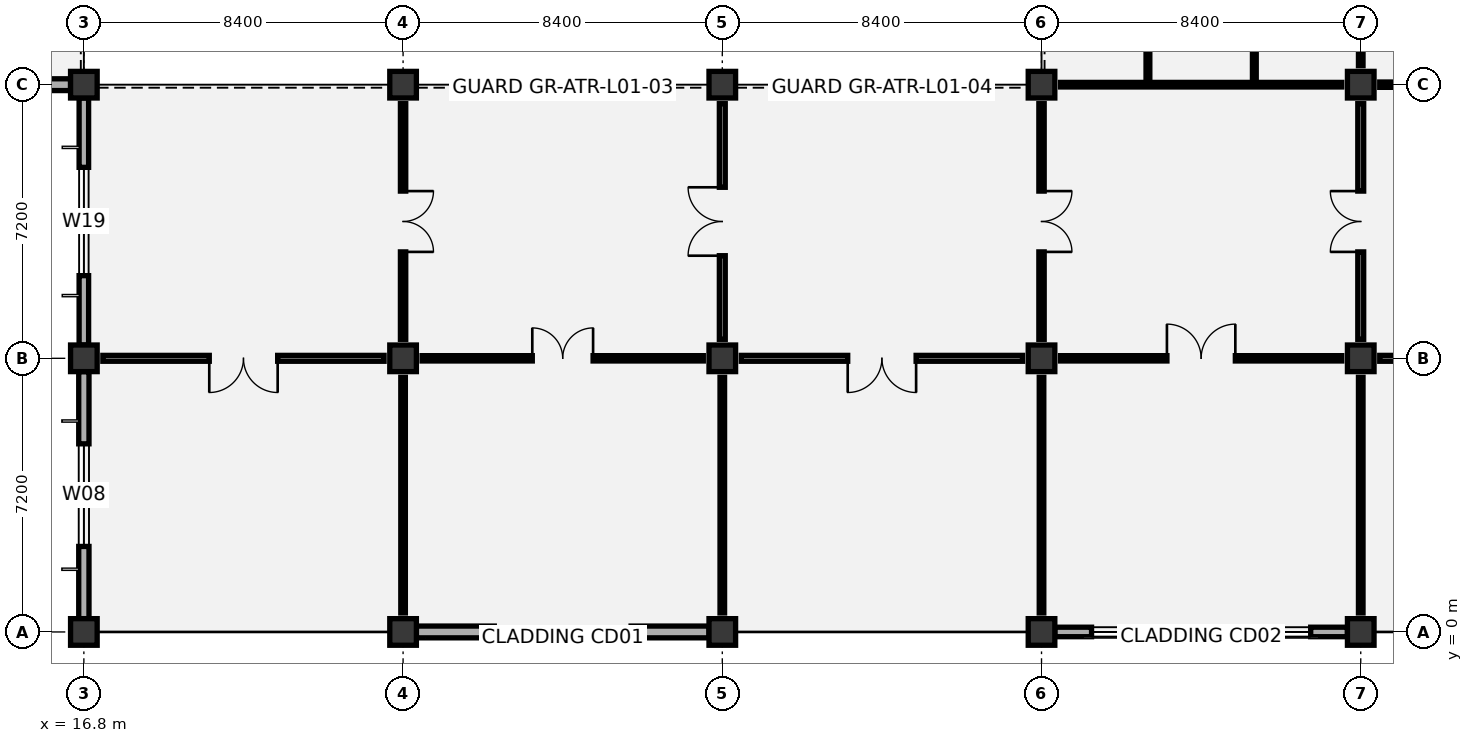
"""IFC4 building model, lengths in metres.
Left out: names, types, materials, properties, quantities, classifications, styles, units other than length and angle.
Written with IfcOpenShell. Run it as: python <this file> out.ifc"""

import sys

from ifc_helpers import new_model, si_unit, direction, frame, frame_2d, origin, origin_2d, place, context, subcontext, project, spatial, rectangle, extrude, element, fill, save


model = new_model("IFC4")
c1 = context("Model", 3, precision=1e-05, world=origin(), true_north=direction((0.0, 1.0)))
c2 = subcontext(c1, "Body", "Model", "MODEL_VIEW")
j1 = project(units=[si_unit("LENGTHUNIT", "METRE"), si_unit("PLANEANGLEUNIT", "RADIAN")], contexts=[c1])
p1 = place(None, origin())
s1 = spatial("IfcSite", under=j1, at=p1, CompositionType="ELEMENT")
p2 = place(p1, origin())
s2 = spatial("IfcBuilding", under=s1, at=p2, CompositionType="ELEMENT")
p3 = place(p2, frame((0.0, 0.0, 6.0)))
s3 = spatial("IfcBuildingStorey", under=s2, at=p3, CompositionType="ELEMENT", Elevation=6.0)
for number, where, z_axis, x_axis in (
    (1, (16.8, 0.0, 0.0), (0.0, 0.0, 1.0), (1.0, 0.0, 0.0)),
    (2, (16.8, 7.2, 0.0), (0.0, 0.0, 1.0), (1.0, 0.0, 0.0)),
    (3, (16.8, 14.4, 0.0), (0.0, 0.0, 1.0), (1.0, 0.0, 0.0)),
    (4, (25.2, 0.0, 0.0), (0.0, 0.0, 1.0), (1.0, 0.0, 0.0)),
    (5, (25.2, 7.2, 0.0), (0.0, 0.0, 1.0), (1.0, 0.0, 0.0)),
    (6, (25.2, 14.4, 0.0), (0.0, 0.0, 1.0), (1.0, 0.0, 0.0)),
    (7, (33.6, 0.0, 0.0), (0.0, 0.0, 1.0), (1.0, 0.0, 0.0)),
    (8, (33.6, 7.2, 0.0), (0.0, 0.0, 1.0), (1.0, 0.0, 0.0)),
    (9, (33.6, 14.4, 0.0), (0.0, 0.0, 1.0), (1.0, 0.0, 0.0)),
    (10, (42.0, 0.0, 0.0), (0.0, 0.0, 1.0), (1.0, 0.0, 0.0)),
    (11, (42.0, 7.2, 0.0), (0.0, 0.0, 1.0), (1.0, 0.0, 0.0)),
    (12, (42.0, 14.4, 0.0), (0.0, 0.0, 1.0), (1.0, 0.0, 0.0)),
    (13, (50.4, 0.0, 0.0), (0.0, 0.0, 1.0), (1.0, 0.0, 0.0)),
    (14, (50.4, 7.2, 0.0), (0.0, 0.0, 1.0), (1.0, 0.0, 0.0)),
    (15, (50.4, 14.4, 0.0), (0.0, 0.0, 1.0), (1.0, 0.0, 0.0)),
):
    element("IfcColumn", number, at=place(p3, frame(where, z_axis=z_axis, x_axis=x_axis)), inside=s3, PredefinedType="COLUMN", context=c2, shape_type="SweptSolid", body=[
        extrude(rectangle(XDim=0.7, YDim=0.7, at=origin_2d()), origin(), (0.0, 0.0, 1.0), 5.4),
    ])
p4 = place(p3, frame((8.75, 14.4, 0.0), z_axis=(0.0, 0.0, 1.0), x_axis=(1.0, 0.0, 0.0)))
e16 = element("IfcWall", 16, at=p4, inside=s3, PredefinedType="SOLIDWALL", context=c2, shape_type="SweptSolid", body=[
    extrude(rectangle(XDim=7.7, YDim=0.31, at=frame_2d((3.85, 0.0))), origin(), (0.0, 0.0, 1.0), 4.42),
])
p5 = place(p4, frame((2.35, 0.0, 0.9)))
e17 = element("IfcOpeningElement", 17, at=p5, cuts=e16, PredefinedType="OPENING", context=c2, shape_type="SweptSolid", body=[
    extrude(rectangle(XDim=3.0, YDim=2.1, at=frame_2d((1.5, 1.05))), frame((0.0, 0.165, 0.0), z_axis=(0.0, -1.0, 0.0), x_axis=(1.0, 0.0, 0.0)), (0.0, 0.0, 1.0), 0.33),
])
p6 = place(p3, frame((16.8, 0.35, 0.0), z_axis=(0.0, 0.0, 1.0), x_axis=(0.0, 1.0, 0.0)))
e18 = element("IfcWall", 18, at=p6, inside=s3, PredefinedType="SOLIDWALL", context=c2, shape_type="SweptSolid", body=[
    extrude(rectangle(XDim=6.5, YDim=0.27, at=frame_2d((3.25, 0.0))), origin(), (0.0, 0.0, 1.0), 4.42),
])
p7 = place(p6, frame((1.9, 0.0, 0.9)))
e19 = element("IfcOpeningElement", 19, at=p7, cuts=e18, PredefinedType="OPENING", context=c2, shape_type="SweptSolid", body=[
    extrude(rectangle(XDim=2.7, YDim=2.1, at=frame_2d((1.35, 1.05))), frame((0.0, 0.145, 0.0), z_axis=(0.0, -1.0, 0.0), x_axis=(1.0, 0.0, 0.0)), (0.0, 0.0, 1.0), 0.29),
])
p8 = place(p3, frame((16.8, 7.55, 0.0), z_axis=(0.0, 0.0, 1.0), x_axis=(0.0, 1.0, 0.0)))
e20 = element("IfcWall", 20, at=p8, inside=s3, PredefinedType="SOLIDWALL", context=c2, shape_type="SweptSolid", body=[
    extrude(rectangle(XDim=6.5, YDim=0.25, at=frame_2d((3.25, 0.0))), origin(), (0.0, 0.0, 1.0), 4.42),
])
p9 = place(p8, frame((1.825, 0.0, 0.9)))
e21 = element("IfcOpeningElement", 21, at=p9, cuts=e20, PredefinedType="OPENING", context=c2, shape_type="SweptSolid", body=[
    extrude(rectangle(XDim=2.85, YDim=1.95, at=frame_2d((1.425, 0.975))), frame((0.0, 0.135, 0.0), z_axis=(0.0, -1.0, 0.0), x_axis=(1.0, 0.0, 0.0)), (0.0, 0.0, 1.0), 0.27),
])
p10 = place(p3, frame((25.55, 0.0, 0.0), z_axis=(0.0, 0.0, 1.0), x_axis=(1.0, 0.0, 0.0)))
e22 = element("IfcWall", 22, at=p10, inside=s3, PredefinedType="SOLIDWALL", context=c2, shape_type="SweptSolid", body=[
    extrude(rectangle(XDim=7.7, YDim=0.31, at=frame_2d((3.85, 0.0))), origin(), (0.0, 0.0, 1.0), 4.42),
])
p11 = place(p10, frame((2.05, 0.0, 0.9)))
e23 = element("IfcOpeningElement", 23, at=p11, cuts=e22, PredefinedType="OPENING", context=c2, shape_type="SweptSolid", body=[
    extrude(rectangle(XDim=3.6, YDim=2.4, at=frame_2d((1.8, 1.2))), frame((0.0, 0.165, 0.0), z_axis=(0.0, -1.0, 0.0), x_axis=(1.0, 0.0, 0.0)), (0.0, 0.0, 1.0), 0.33),
])
p12 = place(p3, frame((42.35, 0.0, 0.0), z_axis=(0.0, 0.0, 1.0), x_axis=(1.0, 0.0, 0.0)))
e24 = element("IfcWall", 24, at=p12, inside=s3, PredefinedType="SOLIDWALL", context=c2, shape_type="SweptSolid", body=[
    extrude(rectangle(XDim=7.7, YDim=0.25, at=frame_2d((3.85, 0.0))), origin(), (0.0, 0.0, 1.0), 4.42),
])
p13 = place(p12, frame((0.967, 0.0, 0.9)))
e25 = element("IfcOpeningElement", 25, at=p13, cuts=e24, PredefinedType="OPENING", context=c2, shape_type="SweptSolid", body=[
    extrude(rectangle(XDim=2.4, YDim=2.1, at=frame_2d((1.2, 1.05))), frame((0.0, 0.135, 0.0), z_axis=(0.0, -1.0, 0.0), x_axis=(1.0, 0.0, 0.0)), (0.0, 0.0, 1.0), 0.27),
])
p14 = place(p12, frame((4.333, 0.0, 0.9)))
e26 = element("IfcOpeningElement", 26, at=p14, cuts=e24, PredefinedType="OPENING", context=c2, shape_type="SweptSolid", body=[
    extrude(rectangle(XDim=2.4, YDim=2.1, at=frame_2d((1.2, 1.05))), frame((0.0, 0.135, 0.0), z_axis=(0.0, -1.0, 0.0), x_axis=(1.0, 0.0, 0.0)), (0.0, 0.0, 1.0), 0.27),
])
p15 = place(p3, frame((8.52, 0.0, 0.0), z_axis=(0.0, 0.0, 1.0), x_axis=(1.0, 0.0, 0.0)))
e27 = element("IfcWall", 27, at=p15, inside=s3, PredefinedType="PARAPET", context=c2, shape_type="SweptSolid", body=[
    extrude(rectangle(XDim=8.16, YDim=0.22, at=frame_2d((4.08, 0.0))), origin(), (0.0, 0.0, 1.0), 1.15),
])
for number, where, z_axis, x_axis in (
    (28, (44.8, 14.55, 0.0), (0.0, 0.0, 1.0), (0.0, 1.0, 0.0)),
    (29, (47.6, 14.55, 0.0), (0.0, 0.0, 1.0), (0.0, 1.0, 0.0)),
):
    element("IfcWall", number, at=place(p3, frame(where, z_axis=z_axis, x_axis=x_axis)), inside=s3, PredefinedType="PARTITIONING", context=c2, shape_type="SweptSolid", body=[
        extrude(rectangle(XDim=4.59, YDim=0.1, at=frame_2d((2.295, 0.0))), origin(), (0.0, 0.0, 1.0), 5.075),
    ])
p16 = place(p3, frame((25.2, 0.5, 0.0), z_axis=(0.0, 0.0, 1.0), x_axis=(0.0, 1.0, 0.0)))
e30 = element("IfcWall", 30, at=p16, inside=s3, PredefinedType="PARTITIONING", context=c2, shape_type="SweptSolid", body=[
    extrude(rectangle(XDim=6.2, YDim=0.12, at=frame_2d((3.1, 0.0))), origin(), (0.0, 0.0, 1.0), 4.57),
])
p17 = place(p3, frame((17.3, 7.2, 0.0), z_axis=(0.0, 0.0, 1.0), x_axis=(1.0, 0.0, 0.0)))
e31 = element("IfcWall", 31, at=p17, inside=s3, PredefinedType="PARTITIONING", context=c2, shape_type="SweptSolid", body=[
    extrude(rectangle(XDim=7.4, YDim=0.155, at=frame_2d((3.7, 0.0))), origin(), (0.0, 0.0, 1.0), 4.27),
])
p18 = place(p17, frame((2.8, 0.0, 0.0)))
e32 = element("IfcOpeningElement", 32, at=p18, cuts=e31, PredefinedType="OPENING", context=c2, shape_type="SweptSolid", body=[
    extrude(rectangle(XDim=1.8, YDim=2.25, at=frame_2d((0.9, 1.125))), frame((0.0, 0.087, 0.0), z_axis=(0.0, -1.0, 0.0), x_axis=(1.0, 0.0, 0.0)), (0.0, 0.0, 1.0), 0.175),
])
p19 = place(p3, frame((25.2, 7.7, 0.0), z_axis=(0.0, 0.0, 1.0), x_axis=(0.0, 1.0, 0.0)))
e33 = element("IfcWall", 33, at=p19, inside=s3, PredefinedType="PARTITIONING", context=c2, shape_type="SweptSolid", body=[
    extrude(rectangle(XDim=6.2, YDim=0.14, at=frame_2d((3.1, 0.0))), origin(), (0.0, 0.0, 1.0), 4.32),
])
p20 = place(p19, frame((2.3, 0.0, 0.0)))
e34 = element("IfcOpeningElement", 34, at=p20, cuts=e33, PredefinedType="OPENING", context=c2, shape_type="SweptSolid", body=[
    extrude(rectangle(XDim=1.6, YDim=2.2, at=frame_2d((0.8, 1.1))), frame((0.0, 0.08, 0.0), z_axis=(0.0, -1.0, 0.0), x_axis=(1.0, 0.0, 0.0)), (0.0, 0.0, 1.0), 0.16),
])
p21 = place(p3, frame((33.6, 0.5, 0.0), z_axis=(0.0, 0.0, 1.0), x_axis=(0.0, 1.0, 0.0)))
e35 = element("IfcWall", 35, at=p21, inside=s3, PredefinedType="PARTITIONING", context=c2, shape_type="SweptSolid", body=[
    extrude(rectangle(XDim=6.2, YDim=0.12, at=frame_2d((3.1, 0.0))), origin(), (0.0, 0.0, 1.0), 4.32),
])
p22 = place(p3, frame((25.7, 7.2, 0.0), z_axis=(0.0, 0.0, 1.0), x_axis=(1.0, 0.0, 0.0)))
e36 = element("IfcWall", 36, at=p22, inside=s3, PredefinedType="PARTITIONING", context=c2, shape_type="SweptSolid", body=[
    extrude(rectangle(XDim=7.4, YDim=0.14, at=frame_2d((3.7, 0.0))), origin(), (0.0, 0.0, 1.0), 4.27),
])
p23 = place(p22, frame((2.9, 0.0, 0.0)))
e37 = element("IfcOpeningElement", 37, at=p23, cuts=e36, PredefinedType="OPENING", context=c2, shape_type="SweptSolid", body=[
    extrude(rectangle(XDim=1.6, YDim=2.2, at=frame_2d((0.8, 1.1))), frame((0.0, 0.08, 0.0), z_axis=(0.0, -1.0, 0.0), x_axis=(1.0, 0.0, 0.0)), (0.0, 0.0, 1.0), 0.16),
])
p24 = place(p3, frame((33.6, 7.7, 0.0), z_axis=(0.0, 0.0, 1.0), x_axis=(0.0, 1.0, 0.0)))
e38 = element("IfcWall", 38, at=p24, inside=s3, PredefinedType="PARTITIONING", context=c2, shape_type="SweptSolid", body=[
    extrude(rectangle(XDim=6.2, YDim=0.155, at=frame_2d((3.1, 0.0))), origin(), (0.0, 0.0, 1.0), 4.67),
])
p25 = place(p24, frame((2.2, 0.0, 0.0)))
e39 = element("IfcOpeningElement", 39, at=p25, cuts=e38, PredefinedType="OPENING", context=c2, shape_type="SweptSolid", body=[
    extrude(rectangle(XDim=1.8, YDim=2.25, at=frame_2d((0.9, 1.125))), frame((0.0, 0.087, 0.0), z_axis=(0.0, -1.0, 0.0), x_axis=(1.0, 0.0, 0.0)), (0.0, 0.0, 1.0), 0.175),
])
p26 = place(p3, frame((42.0, 0.5, 0.0), z_axis=(0.0, 0.0, 1.0), x_axis=(0.0, 1.0, 0.0)))
e40 = element("IfcWall", 40, at=p26, inside=s3, PredefinedType="PARTITIONING", context=c2, shape_type="SweptSolid", body=[
    extrude(rectangle(XDim=6.2, YDim=0.12, at=frame_2d((3.1, 0.0))), origin(), (0.0, 0.0, 1.0), 4.67),
])
p27 = place(p3, frame((34.1, 7.2, 0.0), z_axis=(0.0, 0.0, 1.0), x_axis=(1.0, 0.0, 0.0)))
e41 = element("IfcWall", 41, at=p27, inside=s3, PredefinedType="PARTITIONING", context=c2, shape_type="SweptSolid", body=[
    extrude(rectangle(XDim=7.4, YDim=0.155, at=frame_2d((3.7, 0.0))), origin(), (0.0, 0.0, 1.0), 4.27),
])
p28 = place(p27, frame((2.8, 0.0, 0.0)))
e42 = element("IfcOpeningElement", 42, at=p28, cuts=e41, PredefinedType="OPENING", context=c2, shape_type="SweptSolid", body=[
    extrude(rectangle(XDim=1.8, YDim=2.25, at=frame_2d((0.9, 1.125))), frame((0.0, 0.087, 0.0), z_axis=(0.0, -1.0, 0.0), x_axis=(1.0, 0.0, 0.0)), (0.0, 0.0, 1.0), 0.175),
])
p29 = place(p3, frame((42.0, 7.7, 0.0), z_axis=(0.0, 0.0, 1.0), x_axis=(0.0, 1.0, 0.0)))
e43 = element("IfcWall", 43, at=p29, inside=s3, PredefinedType="PARTITIONING", context=c2, shape_type="SweptSolid", body=[
    extrude(rectangle(XDim=6.2, YDim=0.14, at=frame_2d((3.1, 0.0))), origin(), (0.0, 0.0, 1.0), 4.32),
])
p30 = place(p29, frame((2.3, 0.0, 0.0)))
e44 = element("IfcOpeningElement", 44, at=p30, cuts=e43, PredefinedType="OPENING", context=c2, shape_type="SweptSolid", body=[
    extrude(rectangle(XDim=1.6, YDim=2.2, at=frame_2d((0.8, 1.1))), frame((0.0, 0.08, 0.0), z_axis=(0.0, -1.0, 0.0), x_axis=(1.0, 0.0, 0.0)), (0.0, 0.0, 1.0), 0.16),
])
p31 = place(p3, frame((50.4, 0.5, 0.0), z_axis=(0.0, 0.0, 1.0), x_axis=(0.0, 1.0, 0.0)))
e45 = element("IfcWall", 45, at=p31, inside=s3, PredefinedType="PARTITIONING", context=c2, shape_type="SweptSolid", body=[
    extrude(rectangle(XDim=6.2, YDim=0.12, at=frame_2d((3.1, 0.0))), origin(), (0.0, 0.0, 1.0), 4.32),
])
p32 = place(p3, frame((42.5, 7.2, 0.0), z_axis=(0.0, 0.0, 1.0), x_axis=(1.0, 0.0, 0.0)))
e46 = element("IfcWall", 46, at=p32, inside=s3, PredefinedType="PARTITIONING", context=c2, shape_type="SweptSolid", body=[
    extrude(rectangle(XDim=7.4, YDim=0.14, at=frame_2d((3.7, 0.0))), origin(), (0.0, 0.0, 1.0), 4.27),
])
p33 = place(p32, frame((2.8, 0.0, 0.0)))
e47 = element("IfcOpeningElement", 47, at=p33, cuts=e46, PredefinedType="OPENING", context=c2, shape_type="SweptSolid", body=[
    extrude(rectangle(XDim=1.8, YDim=2.25, at=frame_2d((0.9, 1.125))), frame((0.0, 0.08, 0.0), z_axis=(0.0, -1.0, 0.0), x_axis=(1.0, 0.0, 0.0)), (0.0, 0.0, 1.0), 0.16),
])
p34 = place(p3, frame((50.4, 7.7, 0.0), z_axis=(0.0, 0.0, 1.0), x_axis=(0.0, 1.0, 0.0)))
e48 = element("IfcWall", 48, at=p34, inside=s3, PredefinedType="PARTITIONING", context=c2, shape_type="SweptSolid", body=[
    extrude(rectangle(XDim=6.2, YDim=0.155, at=frame_2d((3.1, 0.0))), origin(), (0.0, 0.0, 1.0), 4.78),
])
p35 = place(p34, frame((2.3, 0.0, 0.0)))
e49 = element("IfcOpeningElement", 49, at=p35, cuts=e48, PredefinedType="OPENING", context=c2, shape_type="SweptSolid", body=[
    extrude(rectangle(XDim=1.6, YDim=2.2, at=frame_2d((0.8, 1.1))), frame((0.0, 0.087, 0.0), z_axis=(0.0, -1.0, 0.0), x_axis=(1.0, 0.0, 0.0)), (0.0, 0.0, 1.0), 0.175),
])
p36 = place(p3, frame((42.5, 14.4, 0.0), z_axis=(0.0, 0.0, 1.0), x_axis=(1.0, 0.0, 0.0)))
e50 = element("IfcWall", 50, at=p36, inside=s3, PredefinedType="PARTITIONING", context=c2, shape_type="SweptSolid", body=[
    extrude(rectangle(XDim=7.4, YDim=0.12, at=frame_2d((3.7, 0.0))), origin(), (0.0, 0.0, 1.0), 4.27),
])
p37 = place(p3, frame((50.4, 14.9, 0.0), z_axis=(0.0, 0.0, 1.0), x_axis=(0.0, 1.0, 0.0)))
e51 = element("IfcWall", 51, at=p37, inside=s3, PredefinedType="PARTITIONING", context=c2, shape_type="SweptSolid", body=[
    extrude(rectangle(XDim=6.2, YDim=0.12, at=frame_2d((3.1, 0.0))), origin(), (0.0, 0.0, 1.0), 4.32),
])
p38 = place(p3, frame((50.9, 7.2, 0.0), z_axis=(0.0, 0.0, 1.0), x_axis=(1.0, 0.0, 0.0)))
e52 = element("IfcWall", 52, at=p38, inside=s3, PredefinedType="PARTITIONING", context=c2, shape_type="SweptSolid", body=[
    extrude(rectangle(XDim=7.4, YDim=0.155, at=frame_2d((3.7, 0.0))), origin(), (0.0, 0.0, 1.0), 4.27),
])
p39 = place(p38, frame((2.8, 0.0, 0.0)))
e53 = element("IfcOpeningElement", 53, at=p39, cuts=e52, PredefinedType="OPENING", context=c2, shape_type="SweptSolid", body=[
    extrude(rectangle(XDim=1.8, YDim=2.25, at=frame_2d((0.9, 1.125))), frame((0.0, 0.087, 0.0), z_axis=(0.0, -1.0, 0.0), x_axis=(1.0, 0.0, 0.0)), (0.0, 0.0, 1.0), 0.175),
])
p40 = place(p3, frame((50.9, 14.4, 0.0), z_axis=(0.0, 0.0, 1.0), x_axis=(1.0, 0.0, 0.0)))
e54 = element("IfcWall", 54, at=p40, inside=s3, PredefinedType="PARTITIONING", context=c2, shape_type="SweptSolid", body=[
    extrude(rectangle(XDim=7.4, YDim=0.14, at=frame_2d((3.7, 0.0))), origin(), (0.0, 0.0, 1.0), 4.27),
])
p41 = place(p40, frame((2.9, 0.0, 0.0)))
e55 = element("IfcOpeningElement", 55, at=p41, cuts=e54, PredefinedType="OPENING", context=c2, shape_type="SweptSolid", body=[
    extrude(rectangle(XDim=1.6, YDim=2.2, at=frame_2d((0.8, 1.1))), frame((0.0, 0.08, 0.0), z_axis=(0.0, -1.0, 0.0), x_axis=(1.0, 0.0, 0.0)), (0.0, 0.0, 1.0), 0.16),
])
p42 = place(p7, origin())
e56 = element("IfcWindow", 56, at=p42, inside=s3, PartitioningType="SINGLE_PANEL", PredefinedType="WINDOW", context=c2, shape_type="SweptSolid", body=[
    extrude(rectangle(XDim=2.7, YDim=2.1, at=frame_2d((1.35, 1.05))), frame((0.0, 0.03, 0.0), z_axis=(0.0, -1.0, 0.0), x_axis=(1.0, 0.0, 0.0)), (0.0, 0.0, 1.0), 0.06),
])
fill(e19, e56)
p43 = place(p9, origin())
e57 = element("IfcWindow", 57, at=p43, inside=s3, PartitioningType="SINGLE_PANEL", PredefinedType="WINDOW", context=c2, shape_type="SweptSolid", body=[
    extrude(rectangle(XDim=2.85, YDim=1.95, at=frame_2d((1.425, 0.975))), frame((0.0, 0.03, 0.0), z_axis=(0.0, -1.0, 0.0), x_axis=(1.0, 0.0, 0.0)), (0.0, 0.0, 1.0), 0.06),
])
fill(e21, e57)
p44 = place(p11, origin())
e58 = element("IfcWindow", 58, at=p44, inside=s3, PartitioningType="SINGLE_PANEL", PredefinedType="WINDOW", context=c2, shape_type="SweptSolid", body=[
    extrude(rectangle(XDim=3.6, YDim=2.4, at=frame_2d((1.8, 1.2))), frame((0.0, 0.03, 0.0), z_axis=(0.0, -1.0, 0.0), x_axis=(1.0, 0.0, 0.0)), (0.0, 0.0, 1.0), 0.06),
])
fill(e23, e58)
p45 = place(p13, origin())
e59 = element("IfcWindow", 59, at=p45, inside=s3, PartitioningType="SINGLE_PANEL", PredefinedType="WINDOW", context=c2, shape_type="SweptSolid", body=[
    extrude(rectangle(XDim=2.4, YDim=2.1, at=frame_2d((1.2, 1.05))), frame((0.0, 0.03, 0.0), z_axis=(0.0, -1.0, 0.0), x_axis=(1.0, 0.0, 0.0)), (0.0, 0.0, 1.0), 0.06),
])
fill(e25, e59)
p46 = place(p14, origin())
e60 = element("IfcWindow", 60, at=p46, inside=s3, PartitioningType="SINGLE_PANEL", PredefinedType="WINDOW", context=c2, shape_type="SweptSolid", body=[
    extrude(rectangle(XDim=2.4, YDim=2.1, at=frame_2d((1.2, 1.05))), frame((0.0, 0.03, 0.0), z_axis=(0.0, -1.0, 0.0), x_axis=(1.0, 0.0, 0.0)), (0.0, 0.0, 1.0), 0.06),
])
fill(e26, e60)
p47 = place(p18, frame((1.8, 0.0, 0.0), z_axis=(0.0, 0.0, 1.0), x_axis=(-1.0, 0.0, 0.0)))
e61 = element("IfcDoor", 61, at=p47, inside=s3, OperationType="DOUBLE_DOOR_SINGLE_SWING", PredefinedType="DOOR", context=c2, shape_type="SweptSolid", body=[
    extrude(rectangle(XDim=1.8, YDim=2.25, at=frame_2d((0.9, 1.125))), frame((0.0, 0.025, 0.0), z_axis=(0.0, -1.0, 0.0), x_axis=(1.0, 0.0, 0.0)), (0.0, 0.0, 1.0), 0.05),
])
fill(e32, e61)
p48 = place(p20, frame((1.6, 0.0, 0.0), z_axis=(0.0, 0.0, 1.0), x_axis=(-1.0, 0.0, 0.0)))
e62 = element("IfcDoor", 62, at=p48, inside=s3, OperationType="DOUBLE_DOOR_SINGLE_SWING", PredefinedType="DOOR", context=c2, shape_type="SweptSolid", body=[
    extrude(rectangle(XDim=1.6, YDim=2.2, at=frame_2d((0.8, 1.1))), frame((0.0, 0.025, 0.0), z_axis=(0.0, -1.0, 0.0), x_axis=(1.0, 0.0, 0.0)), (0.0, 0.0, 1.0), 0.05),
])
fill(e34, e62)
p49 = place(p23, origin())
e63 = element("IfcDoor", 63, at=p49, inside=s3, OperationType="DOUBLE_DOOR_SINGLE_SWING", PredefinedType="DOOR", context=c2, shape_type="SweptSolid", body=[
    extrude(rectangle(XDim=1.6, YDim=2.2, at=frame_2d((0.8, 1.1))), frame((0.0, 0.025, 0.0), z_axis=(0.0, -1.0, 0.0), x_axis=(1.0, 0.0, 0.0)), (0.0, 0.0, 1.0), 0.05),
])
fill(e37, e63)
p50 = place(p25, origin())
e64 = element("IfcDoor", 64, at=p50, inside=s3, OperationType="DOUBLE_DOOR_SINGLE_SWING", PredefinedType="DOOR", context=c2, shape_type="SweptSolid", body=[
    extrude(rectangle(XDim=1.8, YDim=2.25, at=frame_2d((0.9, 1.125))), frame((0.0, 0.025, 0.0), z_axis=(0.0, -1.0, 0.0), x_axis=(1.0, 0.0, 0.0)), (0.0, 0.0, 1.0), 0.05),
])
fill(e39, e64)
p51 = place(p28, frame((1.8, 0.0, 0.0), z_axis=(0.0, 0.0, 1.0), x_axis=(-1.0, 0.0, 0.0)))
e65 = element("IfcDoor", 65, at=p51, inside=s3, OperationType="DOUBLE_DOOR_SINGLE_SWING", PredefinedType="DOOR", context=c2, shape_type="SweptSolid", body=[
    extrude(rectangle(XDim=1.8, YDim=2.25, at=frame_2d((0.9, 1.125))), frame((0.0, 0.025, 0.0), z_axis=(0.0, -1.0, 0.0), x_axis=(1.0, 0.0, 0.0)), (0.0, 0.0, 1.0), 0.05),
])
fill(e42, e65)
p52 = place(p30, frame((1.6, 0.0, 0.0), z_axis=(0.0, 0.0, 1.0), x_axis=(-1.0, 0.0, 0.0)))
e66 = element("IfcDoor", 66, at=p52, inside=s3, OperationType="DOUBLE_DOOR_SINGLE_SWING", PredefinedType="DOOR", context=c2, shape_type="SweptSolid", body=[
    extrude(rectangle(XDim=1.6, YDim=2.2, at=frame_2d((0.8, 1.1))), frame((0.0, 0.025, 0.0), z_axis=(0.0, -1.0, 0.0), x_axis=(1.0, 0.0, 0.0)), (0.0, 0.0, 1.0), 0.05),
])
fill(e44, e66)
p53 = place(p33, origin())
e67 = element("IfcDoor", 67, at=p53, inside=s3, OperationType="DOUBLE_DOOR_SINGLE_SWING", PredefinedType="DOOR", context=c2, shape_type="SweptSolid", body=[
    extrude(rectangle(XDim=1.8, YDim=2.25, at=frame_2d((0.9, 1.125))), frame((0.0, 0.025, 0.0), z_axis=(0.0, -1.0, 0.0), x_axis=(1.0, 0.0, 0.0)), (0.0, 0.0, 1.0), 0.05),
])
fill(e47, e67)
p54 = place(p35, origin())
e68 = element("IfcDoor", 68, at=p54, inside=s3, OperationType="DOUBLE_DOOR_SINGLE_SWING", PredefinedType="DOOR", context=c2, shape_type="SweptSolid", body=[
    extrude(rectangle(XDim=1.6, YDim=2.2, at=frame_2d((0.8, 1.1))), frame((0.0, 0.025, 0.0), z_axis=(0.0, -1.0, 0.0), x_axis=(1.0, 0.0, 0.0)), (0.0, 0.0, 1.0), 0.05),
])
fill(e49, e68)
save(model, sys.argv[1])
